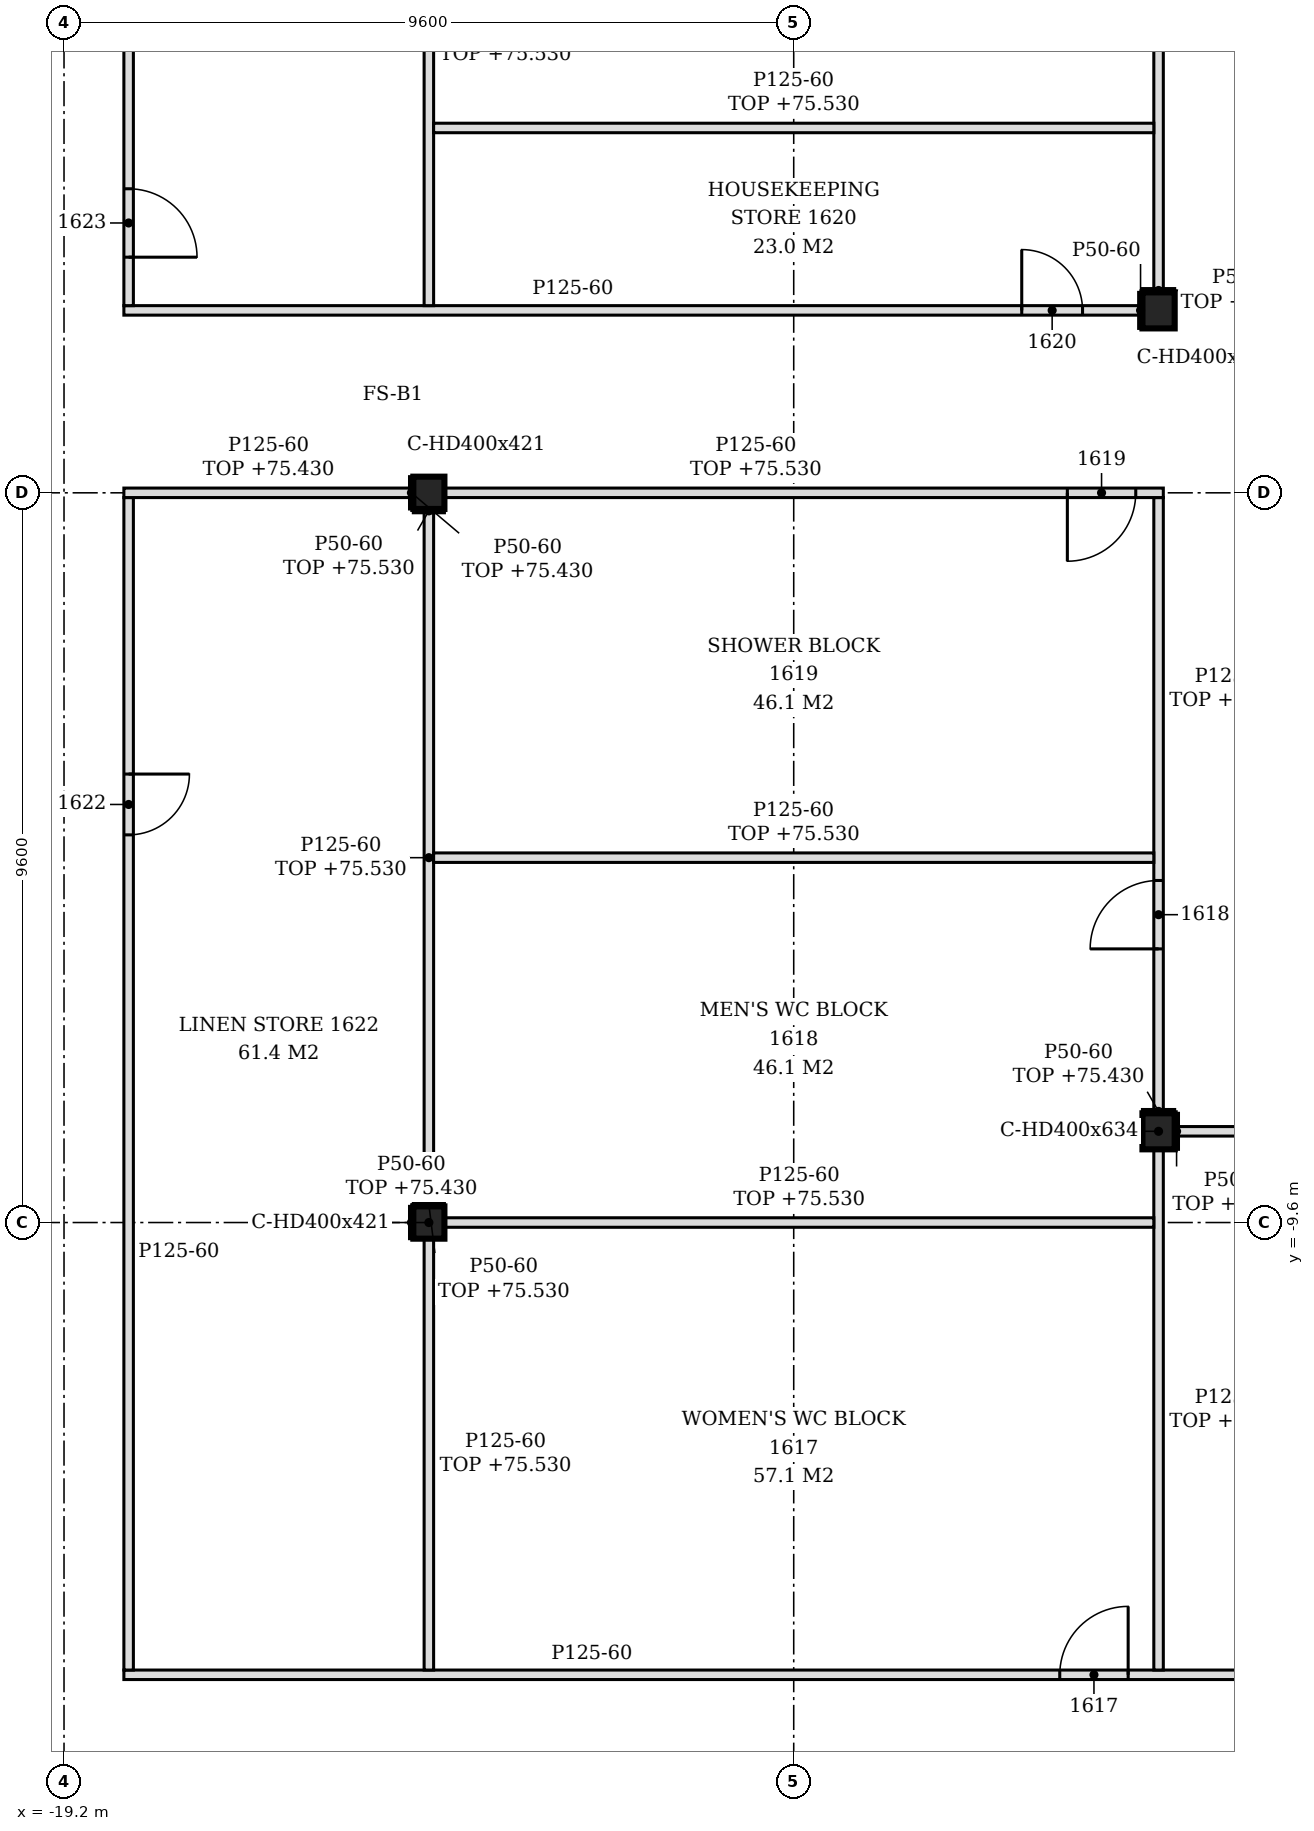
"""IFC4 building model, lengths in metres.
Left out: names, types, materials, properties, quantities, classifications, styles, units other than length and angle.
Written with IfcOpenShell. Run it as: python <this file> out.ifc"""

import sys

from ifc_helpers import new_model, si_unit, direction, frame, frame_2d, origin, origin_2d, place, context, subcontext, project, spatial, polyline, rectangle, i_section, outline, extrude, element, fill, save


model = new_model("IFC4")
c1 = context("Model", 3, precision=1e-05, world=origin(), true_north=direction((0.0, 1.0)))
c2 = subcontext(c1, "Body", "Model", "MODEL_VIEW")
j1 = project(units=[si_unit("LENGTHUNIT", "METRE"), si_unit("PLANEANGLEUNIT", "RADIAN")], contexts=[c1])
p1 = place(None, origin())
s1 = spatial("IfcSite", under=j1, at=p1, CompositionType="ELEMENT")
p2 = place(p1, origin())
s2 = spatial("IfcBuilding", under=s1, at=p2, CompositionType="ELEMENT")
p3 = place(p2, frame((0.0, 0.0, 72.6)))
s3 = spatial("IfcBuildingStorey", under=s2, at=p3, CompositionType="ELEMENT", Elevation=72.6)
for number, where, z_axis, x_axis in (
    (1, (-4.8, -8.4, -0.15), (0.0, 0.0, 1.0), (1.0, 0.0, 0.0)),
    (2, (-4.8, 2.4, -0.15), (0.0, 0.0, 1.0), (1.0, 0.0, 0.0)),
):
    element("IfcColumn", number, at=place(p3, frame(where, z_axis=z_axis, x_axis=x_axis)), inside=s3, PredefinedType="COLUMN", context=c2, shape_type="SweptSolid", body=[
        extrude(i_section(OverallWidth=0.424, OverallDepth=0.474, WebThickness=0.048, FlangeThickness=0.077, FilletRadius=0.015, at=origin_2d()), origin(), (0.0, 0.0, 1.0), 3.6),
    ])
for number, where, z_axis, x_axis in (
    (3, (-14.4, -9.6, -0.15), (0.0, 0.0, 1.0), (1.0, 0.0, 0.0)),
    (4, (-14.4, 0.0, -0.15), (0.0, 0.0, 1.0), (1.0, 0.0, 0.0)),
):
    element("IfcColumn", number, at=place(p3, frame(where, z_axis=z_axis, x_axis=x_axis)), inside=s3, PredefinedType="COLUMN", context=c2, shape_type="SweptSolid", body=[
        extrude(i_section(OverallWidth=0.409, OverallDepth=0.425, WebThickness=0.033, FlangeThickness=0.052, FilletRadius=0.015, at=origin_2d()), origin(), (0.0, 0.0, 1.0), 3.6),
    ])
p4 = place(p3, frame((-18.413, -15.55, 0.0), z_axis=(0.0, 0.0, 1.0), x_axis=(1.0, 0.0, 0.0)))
e5 = element("IfcWall", 5, at=p4, inside=s3, PredefinedType="PARTITIONING", context=c2, shape_type="SweptSolid", body=[
    extrude(outline(polyline([(0.0, 0.0), (18.475, 0.0), (18.475, 3.45), (13.762, 3.45), (13.76, 2.73), (13.462, 2.73), (13.46, 3.45), (4.163, 3.45), (4.16, 2.93), (3.863, 2.93), (3.861, 3.45), (0.0, 3.45), (0.0, 0.0)])), frame((0.0, 0.062, 0.0), z_axis=(0.0, -1.0, 0.0), x_axis=(1.0, 0.0, 0.0)), (0.0, 0.0, 1.0), 0.125),
])
p5 = place(p4, frame((12.312, 0.0, 0.0)))
e6 = element("IfcOpeningElement", 6, at=p5, cuts=e5, PredefinedType="OPENING", context=c2, shape_type="SweptSolid", body=[
    extrude(rectangle(XDim=0.9, YDim=2.1, at=frame_2d((0.45, 1.05))), frame((0.0, 0.073, 0.0), z_axis=(0.0, -1.0, 0.0), x_axis=(1.0, 0.0, 0.0)), (0.0, 0.0, 1.0), 0.145),
])
p6 = place(p3, frame((-18.35, -15.488, 0.0), z_axis=(0.0, 0.0, 1.0), x_axis=(0.0, 1.0, 0.0)))
e7 = element("IfcWall", 7, at=p6, inside=s3, PredefinedType="PARTITIONING", context=c2, shape_type="SweptSolid", body=[
    extrude(outline(polyline([(0.0, 0.0), (15.425, 0.0), (15.425, 2.83), (15.377, 2.83), (15.375, 3.45), (10.798, 3.45), (10.795, 2.83), (10.577, 2.83), (10.575, 3.45), (5.998, 3.45), (5.996, 2.83), (5.778, 2.83), (5.775, 3.45), (1.198, 3.45), (1.196, 2.83), (0.978, 2.83), (0.976, 3.45), (0.0, 3.45), (0.0, 0.0)])), frame((0.0, 0.062, 0.0), z_axis=(0.0, -1.0, 0.0), x_axis=(1.0, 0.0, 0.0)), (0.0, 0.0, 1.0), 0.125),
])
p7 = place(p6, frame((10.988, 0.0, 0.0)))
e8 = element("IfcOpeningElement", 8, at=p7, cuts=e7, PredefinedType="OPENING", context=c2, shape_type="SweptSolid", body=[
    extrude(rectangle(XDim=0.8, YDim=2.1, at=frame_2d((0.4, 1.05))), frame((0.0, 0.073, 0.0), z_axis=(0.0, -1.0, 0.0), x_axis=(1.0, 0.0, 0.0)), (0.0, 0.0, 1.0), 0.145),
])
p8 = place(p3, frame((-14.4, -15.488, 0.0), z_axis=(0.0, 0.0, 1.0), x_axis=(0.0, 1.0, 0.0)))
e9 = element("IfcWall", 9, at=p8, inside=s3, PredefinedType="PARTITIONING", context=c2, shape_type="SweptSolid", body=[
    extrude(rectangle(XDim=5.675, YDim=0.125, at=frame_2d((2.837, 0.0))), origin(), (0.0, 0.0, 1.0), 2.93),
])
p9 = place(p3, frame((-4.8, -15.488, 0.0), z_axis=(0.0, 0.0, 1.0), x_axis=(0.0, 1.0, 0.0)))
e10 = element("IfcWall", 10, at=p9, inside=s3, PredefinedType="PARTITIONING", context=c2, shape_type="SweptSolid", body=[
    extrude(rectangle(XDim=6.851, YDim=0.125, at=frame_2d((3.425, 0.0))), origin(), (0.0, 0.0, 1.0), 2.73),
])
p10 = place(p3, frame((-14.196, -9.6, 0.0), z_axis=(0.0, 0.0, 1.0), x_axis=(1.0, 0.0, 0.0)))
e11 = element("IfcWall", 11, at=p10, inside=s3, PredefinedType="PARTITIONING", context=c2, shape_type="SweptSolid", body=[
    extrude(outline(polyline([(0.0, 0.0), (9.333, 0.0), (9.333, 2.73), (9.246, 2.73), (9.243, 2.93), (0.0, 2.93), (0.0, 0.0)])), frame((0.0, 0.062, 0.0), z_axis=(0.0, -1.0, 0.0), x_axis=(1.0, 0.0, 0.0)), (0.0, 0.0, 1.0), 0.125),
])
p11 = place(p3, frame((-14.4, -9.387, 0.0), z_axis=(0.0, 0.0, 1.0), x_axis=(0.0, 1.0, 0.0)))
e12 = element("IfcWall", 12, at=p11, inside=s3, PredefinedType="PARTITIONING", context=c2, shape_type="SweptSolid", body=[
    extrude(rectangle(XDim=9.175, YDim=0.125, at=frame_2d((4.587, 0.0))), origin(), (0.0, 0.0, 1.0), 2.93),
])
p12 = place(p3, frame((-4.588, -8.4, 0.0), z_axis=(0.0, 0.0, 1.0), x_axis=(1.0, 0.0, 0.0)))
e13 = element("IfcWall", 13, at=p12, inside=s3, PredefinedType="PARTITIONING", context=c2, shape_type="SweptSolid", body=[
    extrude(rectangle(XDim=4.65, YDim=0.125, at=frame_2d((2.325, 0.0))), origin(), (0.0, 0.0, 1.0), 2.83),
])
p13 = place(p3, frame((-4.8, -8.163, 0.0), z_axis=(0.0, 0.0, 1.0), x_axis=(0.0, 1.0, 0.0)))
e14 = element("IfcWall", 14, at=p13, inside=s3, PredefinedType="PARTITIONING", context=c2, shape_type="SweptSolid", body=[
    extrude(rectangle(XDim=8.101, YDim=0.125, at=frame_2d((4.05, 0.0))), origin(), (0.0, 0.0, 1.0), 2.83),
])
p14 = place(p13, frame((2.163, 0.0, 0.0)))
e15 = element("IfcOpeningElement", 15, at=p14, cuts=e14, PredefinedType="OPENING", context=c2, shape_type="SweptSolid", body=[
    extrude(rectangle(XDim=0.9, YDim=2.1, at=frame_2d((0.45, 1.05))), frame((0.0, 0.073, 0.0), z_axis=(0.0, -1.0, 0.0), x_axis=(1.0, 0.0, 0.0)), (0.0, 0.0, 1.0), 0.145),
])
p15 = place(p3, frame((-14.337, -4.8, 0.0), z_axis=(0.0, 0.0, 1.0), x_axis=(1.0, 0.0, 0.0)))
e16 = element("IfcWall", 16, at=p15, inside=s3, PredefinedType="PARTITIONING", context=c2, shape_type="SweptSolid", body=[
    extrude(outline(polyline([(0.0, 0.0), (9.475, 0.0), (9.475, 2.83), (9.387, 2.83), (9.385, 2.93), (0.0, 2.93), (0.0, 0.0)])), frame((0.0, 0.062, 0.0), z_axis=(0.0, -1.0, 0.0), x_axis=(1.0, 0.0, 0.0)), (0.0, 0.0, 1.0), 0.125),
])
p16 = place(p3, frame((-18.413, 0.0, 0.0), z_axis=(0.0, 0.0, 1.0), x_axis=(1.0, 0.0, 0.0)))
e17 = element("IfcWall", 17, at=p16, inside=s3, PredefinedType="PARTITIONING", context=c2, shape_type="SweptSolid", body=[
    extrude(rectangle(XDim=3.808, YDim=0.125, at=frame_2d((1.904, 0.0))), origin(), (0.0, 0.0, 1.0), 2.83),
])
p17 = place(p3, frame((-14.196, 0.0, 0.0), z_axis=(0.0, 0.0, 1.0), x_axis=(1.0, 0.0, 0.0)))
e18 = element("IfcWall", 18, at=p17, inside=s3, PredefinedType="PARTITIONING", context=c2, shape_type="SweptSolid", body=[
    extrude(outline(polyline([(0.0, 0.0), (9.458, 0.0), (9.458, 2.83), (9.246, 2.83), (9.243, 2.93), (0.0, 2.93), (0.0, 0.0)])), frame((0.0, 0.062, 0.0), z_axis=(0.0, -1.0, 0.0), x_axis=(1.0, 0.0, 0.0)), (0.0, 0.0, 1.0), 0.125),
])
p18 = place(p17, frame((8.196, 0.0, 0.0)))
e19 = element("IfcOpeningElement", 19, at=p18, cuts=e18, PredefinedType="OPENING", context=c2, shape_type="SweptSolid", body=[
    extrude(rectangle(XDim=0.9, YDim=2.1, at=frame_2d((0.45, 1.05))), frame((0.0, 0.073, 0.0), z_axis=(0.0, -1.0, 0.0), x_axis=(1.0, 0.0, 0.0)), (0.0, 0.0, 1.0), 0.145),
])
p19 = place(p3, frame((-18.413, 2.4, 0.0), z_axis=(0.0, 0.0, 1.0), x_axis=(1.0, 0.0, 0.0)))
e20 = element("IfcWall", 20, at=p19, inside=s3, PredefinedType="PARTITIONING", context=c2, shape_type="SweptSolid", body=[
    extrude(outline(polyline([(0.0, 0.0), (13.401, 0.0), (13.4, 3.45), (4.163, 3.45), (4.16, 2.93), (3.863, 2.93), (3.861, 3.45), (0.0, 3.45), (0.0, 0.0)])), frame((0.0, 0.062, 0.0), z_axis=(0.0, -1.0, 0.0), x_axis=(1.0, 0.0, 0.0)), (0.0, 0.0, 1.0), 0.125),
])
p20 = place(p19, frame((11.812, 0.0, 0.0)))
e21 = element("IfcOpeningElement", 21, at=p20, cuts=e20, PredefinedType="OPENING", context=c2, shape_type="SweptSolid", body=[
    extrude(rectangle(XDim=0.8, YDim=2.1, at=frame_2d((0.4, 1.05))), frame((0.0, 0.073, 0.0), z_axis=(0.0, -1.0, 0.0), x_axis=(1.0, 0.0, 0.0)), (0.0, 0.0, 1.0), 0.145),
])
p21 = place(p3, frame((-18.35, 2.462, 0.0), z_axis=(0.0, 0.0, 1.0), x_axis=(0.0, 1.0, 0.0)))
e22 = element("IfcWall", 22, at=p21, inside=s3, PredefinedType="PARTITIONING", context=c2, shape_type="SweptSolid", body=[
    extrude(outline(polyline([(0.0, 0.0), (8.275, 0.0), (8.275, 3.45), (7.248, 3.45), (7.246, 2.83), (7.028, 2.83), (7.025, 3.45), (2.448, 3.45), (2.446, 2.83), (2.228, 2.83), (2.226, 3.45), (0.0, 3.45), (0.0, 0.0)])), frame((0.0, 0.062, 0.0), z_axis=(0.0, -1.0, 0.0), x_axis=(1.0, 0.0, 0.0)), (0.0, 0.0, 1.0), 0.125),
])
p22 = place(p21, frame((0.637, 0.0, 0.0)))
e23 = element("IfcOpeningElement", 23, at=p22, cuts=e22, PredefinedType="OPENING", context=c2, shape_type="SweptSolid", body=[
    extrude(rectangle(XDim=0.9, YDim=2.1, at=frame_2d((0.45, 1.05))), frame((0.0, 0.073, 0.0), z_axis=(0.0, -1.0, 0.0), x_axis=(1.0, 0.0, 0.0)), (0.0, 0.0, 1.0), 0.145),
])
p23 = place(p3, frame((-14.4, 2.462, 0.0), z_axis=(0.0, 0.0, 1.0), x_axis=(0.0, 1.0, 0.0)))
e24 = element("IfcWall", 24, at=p23, inside=s3, PredefinedType="PARTITIONING", context=c2, shape_type="SweptSolid", body=[
    extrude(rectangle(XDim=6.925, YDim=0.125, at=frame_2d((3.462, 0.0))), origin(), (0.0, 0.0, 1.0), 2.93),
])
p24 = place(p3, frame((-4.8, 2.637, 0.0), z_axis=(0.0, 0.0, 1.0), x_axis=(0.0, 1.0, 0.0)))
e25 = element("IfcWall", 25, at=p24, inside=s3, PredefinedType="PARTITIONING", context=c2, shape_type="SweptSolid", body=[
    extrude(rectangle(XDim=8.101, YDim=0.125, at=frame_2d((4.05, 0.0))), origin(), (0.0, 0.0, 1.0), 2.83),
])
p25 = place(p3, frame((-14.337, 4.8, 0.0), z_axis=(0.0, 0.0, 1.0), x_axis=(1.0, 0.0, 0.0)))
e26 = element("IfcWall", 26, at=p25, inside=s3, PredefinedType="PARTITIONING", context=c2, shape_type="SweptSolid", body=[
    extrude(outline(polyline([(0.0, 0.0), (9.475, 0.0), (9.475, 2.83), (9.387, 2.83), (9.385, 2.93), (0.0, 2.93), (0.0, 0.0)])), frame((0.0, 0.062, 0.0), z_axis=(0.0, -1.0, 0.0), x_axis=(1.0, 0.0, 0.0)), (0.0, 0.0, 1.0), 0.125),
])
p26 = place(p3, frame((-14.629, -9.812, 0.0), z_axis=(0.0, 0.0, 1.0), x_axis=(0.0, 1.0, 0.0)))
e27 = element("IfcWall", 27, at=p26, inside=s3, PredefinedType="PARTITIONING", context=c2, shape_type="SweptSolid", body=[
    extrude(rectangle(XDim=0.425, YDim=0.05, at=frame_2d((0.212, 0.0))), origin(), (0.0, 0.0, 1.0), 2.83),
])
p27 = place(p3, frame((-14.629, -0.212, 0.0), z_axis=(0.0, 0.0, 1.0), x_axis=(0.0, 1.0, 0.0)))
e28 = element("IfcWall", 28, at=p27, inside=s3, PredefinedType="PARTITIONING", context=c2, shape_type="SweptSolid", body=[
    extrude(rectangle(XDim=0.425, YDim=0.05, at=frame_2d((0.212, 0.0))), origin(), (0.0, 0.0, 1.0), 2.83),
])
p28 = place(p3, frame((-4.563, -8.637, 0.0), z_axis=(0.0, 0.0, 1.0), x_axis=(0.0, 1.0, 0.0)))
e29 = element("IfcWall", 29, at=p28, inside=s3, PredefinedType="PARTITIONING", context=c2, shape_type="SweptSolid", body=[
    extrude(rectangle(XDim=0.474, YDim=0.05, at=frame_2d((0.237, 0.0))), origin(), (0.0, 0.0, 1.0), 2.83),
])
p29 = place(p3, frame((-14.604, -9.363, 0.0), z_axis=(0.0, 0.0, 1.0), x_axis=(1.0, 0.0, 0.0)))
e30 = element("IfcWall", 30, at=p29, inside=s3, PredefinedType="PARTITIONING", context=c2, shape_type="SweptSolid", body=[
    extrude(rectangle(XDim=0.409, YDim=0.05, at=frame_2d((0.205, 0.0))), origin(), (0.0, 0.0, 1.0), 2.93),
])
p30 = place(p3, frame((-5.012, -8.138, 0.0), z_axis=(0.0, 0.0, 1.0), x_axis=(1.0, 0.0, 0.0)))
e31 = element("IfcWall", 31, at=p30, inside=s3, PredefinedType="PARTITIONING", context=c2, shape_type="SweptSolid", body=[
    extrude(rectangle(XDim=0.424, YDim=0.05, at=frame_2d((0.212, 0.0))), origin(), (0.0, 0.0, 1.0), 2.83),
])
p31 = place(p3, frame((-14.604, -0.238, 0.0), z_axis=(0.0, 0.0, 1.0), x_axis=(1.0, 0.0, 0.0)))
e32 = element("IfcWall", 32, at=p31, inside=s3, PredefinedType="PARTITIONING", context=c2, shape_type="SweptSolid", body=[
    extrude(rectangle(XDim=0.409, YDim=0.05, at=frame_2d((0.205, 0.0))), origin(), (0.0, 0.0, 1.0), 2.93),
])
p32 = place(p3, frame((-5.012, 2.662, 0.0), z_axis=(0.0, 0.0, 1.0), x_axis=(1.0, 0.0, 0.0)))
e33 = element("IfcWall", 33, at=p32, inside=s3, PredefinedType="PARTITIONING", context=c2, shape_type="SweptSolid", body=[
    extrude(rectangle(XDim=0.424, YDim=0.05, at=frame_2d((0.212, 0.0))), origin(), (0.0, 0.0, 1.0), 2.83),
])
p33 = place(p3, frame((-5.037, 2.163, 0.0), z_axis=(0.0, 0.0, 1.0), x_axis=(0.0, 1.0, 0.0)))
e34 = element("IfcWall", 34, at=p33, inside=s3, PredefinedType="PARTITIONING", context=c2, shape_type="SweptSolid", body=[
    extrude(rectangle(XDim=0.474, YDim=0.05, at=frame_2d((0.237, 0.0))), origin(), (0.0, 0.0, 1.0), 3.45),
])
p34 = place(p5, origin())
e35 = element("IfcDoor", 35, at=p34, inside=s3, OperationType="SINGLE_SWING_RIGHT", PredefinedType="DOOR", context=c2, shape_type="SweptSolid", body=[
    extrude(rectangle(XDim=0.9, YDim=2.1, at=frame_2d((0.45, 1.05))), frame((0.0, 0.025, 0.0), z_axis=(0.0, -1.0, 0.0), x_axis=(1.0, 0.0, 0.0)), (0.0, 0.0, 1.0), 0.05),
])
fill(e6, e35)
p35 = place(p14, origin())
e36 = element("IfcDoor", 36, at=p35, inside=s3, OperationType="SINGLE_SWING_LEFT", PredefinedType="DOOR", context=c2, shape_type="SweptSolid", body=[
    extrude(rectangle(XDim=0.9, YDim=2.1, at=frame_2d((0.45, 1.05))), frame((0.0, 0.025, 0.0), z_axis=(0.0, -1.0, 0.0), x_axis=(1.0, 0.0, 0.0)), (0.0, 0.0, 1.0), 0.05),
])
fill(e15, e36)
p36 = place(p18, frame((0.9, 0.0, 0.0), z_axis=(0.0, 0.0, 1.0), x_axis=(-1.0, 0.0, 0.0)))
e37 = element("IfcDoor", 37, at=p36, inside=s3, OperationType="SINGLE_SWING_RIGHT", PredefinedType="DOOR", context=c2, shape_type="SweptSolid", body=[
    extrude(rectangle(XDim=0.9, YDim=2.1, at=frame_2d((0.45, 1.05))), frame((0.0, 0.025, 0.0), z_axis=(0.0, -1.0, 0.0), x_axis=(1.0, 0.0, 0.0)), (0.0, 0.0, 1.0), 0.05),
])
fill(e19, e37)
p37 = place(p20, origin())
e38 = element("IfcDoor", 38, at=p37, inside=s3, OperationType="SINGLE_SWING_LEFT", PredefinedType="DOOR", context=c2, shape_type="SweptSolid", body=[
    extrude(rectangle(XDim=0.8, YDim=2.1, at=frame_2d((0.4, 1.05))), frame((0.0, 0.025, 0.0), z_axis=(0.0, -1.0, 0.0), x_axis=(1.0, 0.0, 0.0)), (0.0, 0.0, 1.0), 0.05),
])
fill(e21, e38)
p38 = place(p7, frame((0.8, 0.0, 0.0), z_axis=(0.0, 0.0, 1.0), x_axis=(-1.0, 0.0, 0.0)))
e39 = element("IfcDoor", 39, at=p38, inside=s3, OperationType="SINGLE_SWING_LEFT", PredefinedType="DOOR", context=c2, shape_type="SweptSolid", body=[
    extrude(rectangle(XDim=0.8, YDim=2.1, at=frame_2d((0.4, 1.05))), frame((0.0, 0.025, 0.0), z_axis=(0.0, -1.0, 0.0), x_axis=(1.0, 0.0, 0.0)), (0.0, 0.0, 1.0), 0.05),
])
fill(e8, e39)
p39 = place(p22, frame((0.9, 0.0, 0.0), z_axis=(0.0, 0.0, 1.0), x_axis=(-1.0, 0.0, 0.0)))
e40 = element("IfcDoor", 40, at=p39, inside=s3, OperationType="SINGLE_SWING_RIGHT", PredefinedType="DOOR", context=c2, shape_type="SweptSolid", body=[
    extrude(rectangle(XDim=0.9, YDim=2.1, at=frame_2d((0.45, 1.05))), frame((0.0, 0.025, 0.0), z_axis=(0.0, -1.0, 0.0), x_axis=(1.0, 0.0, 0.0)), (0.0, 0.0, 1.0), 0.05),
])
fill(e23, e40)
save(model, sys.argv[1])
